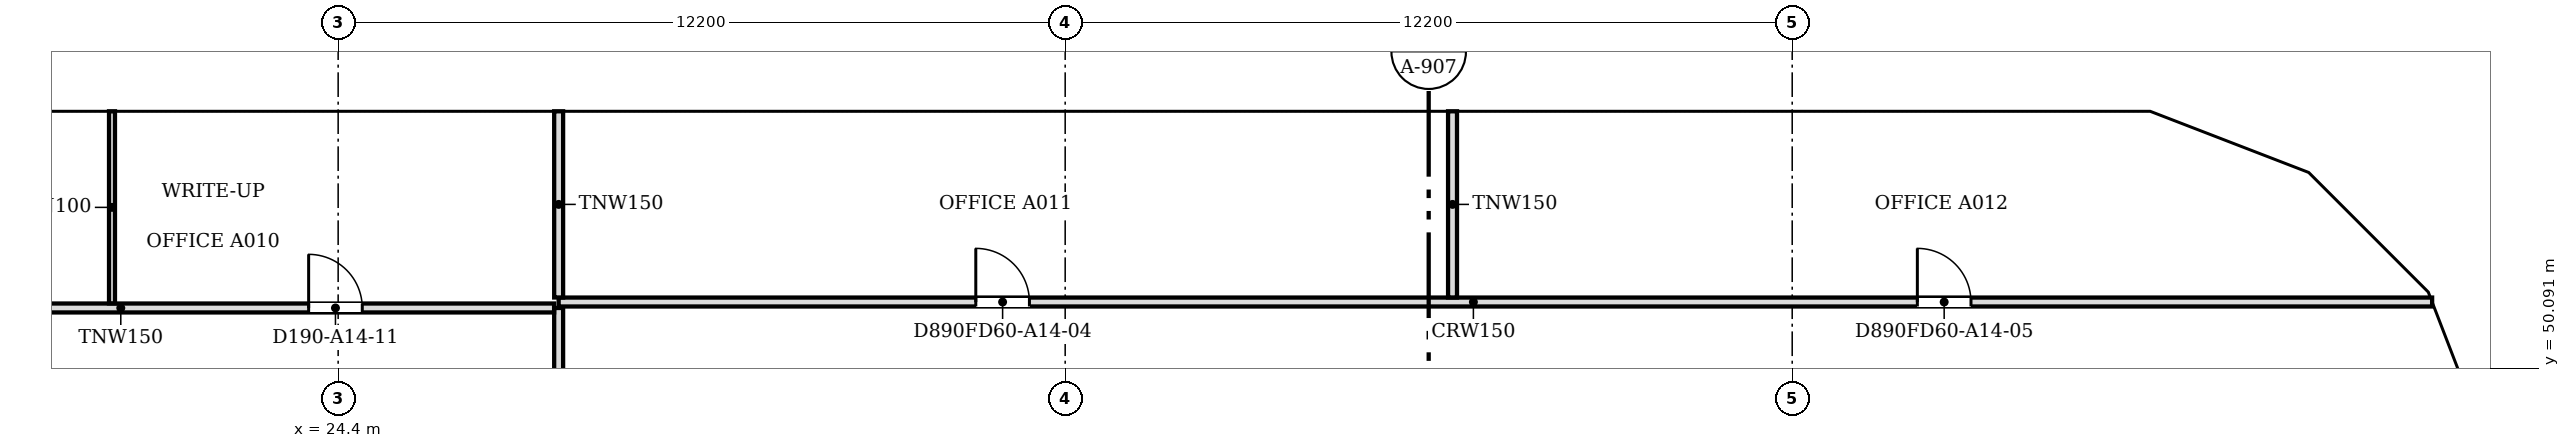
"""IFC4 building model, lengths in metres.
Left out: names, types, materials, properties, quantities, classifications, styles, units other than length and angle.
Written with IfcOpenShell. Run it as: python <this file> out.ifc"""

import sys

from ifc_helpers import new_model, si_unit, direction, frame, frame_2d, origin, place, context, subcontext, project, spatial, polyline, rectangle, outline, extrude, faceted_brep, source, transform, mapped, element, fill, save


model = new_model("IFC4")
c1 = context("Model", 3, precision=1e-05, world=origin(), true_north=direction((0.0, 1.0)))
c2 = subcontext(c1, "Body", "Model", "MODEL_VIEW")
j1 = project(units=[si_unit("LENGTHUNIT", "METRE"), si_unit("PLANEANGLEUNIT", "RADIAN")], contexts=[c1])
p1 = place(None, origin())
s1 = spatial("IfcSite", under=j1, at=p1, CompositionType="ELEMENT")
p2 = place(p1, origin())
s2 = spatial("IfcBuilding", under=s1, at=p2, CompositionType="ELEMENT")
p3 = place(p2, frame((0.0, 0.0, 159.2)))
s3 = spatial("IfcBuildingStorey", under=s2, at=p3, CompositionType="ELEMENT", Elevation=159.2)
m1 = source(origin(), c2, "Body", "Brep", [
    faceted_brep([(0.047, -0.25, 0.0), (2.997, -0.25, 3.8), (0.047, -0.25, 7.6), (0.0, -0.25, 7.541), (0.0, -0.25, 0.059), (0.093, 0.25, 7.54), (2.944, 0.25, 3.868), (2.944, 0.25, 3.732), (0.093, 0.25, 0.06), (2.997, 0.0, 3.8), (0.047, 0.0, 0.0), (0.047, 0.0, 7.6)], [[[0, 1, 2, 3, 4]], [[5, 6, 7, 8]], [[8, 7, 9, 1, 0, 10]], [[6, 5, 11, 2, 1, 9]], [[3, 2, 11]], [[10, 0, 4]], [[8, 10, 4, 3, 11, 5]], [[9, 7, 6]]]),
])
p4 = place(p3, frame((60.767, 48.71, -3.8), z_axis=(0.0, 0.0, 1.0), x_axis=(-0.359901446078, 0.932990326376, 0.0)))
e1 = element("IfcWall", 1, at=p4, inside=s3, PredefinedType="SOLIDWALL", context=c2, shape_type="MappedRepresentation", body=[
    mapped(m1, transform((0.0, 0.0, 0.0), scale=1.0)),
])
m2 = source(origin(), c2, "Body", "SweptSolid", [
    extrude(outline(polyline([(0.247, 0.665), (2.681, 3.8), (0.247, 6.935), (0.247, 0.665)])), frame((0.0, 0.26, 0.0), z_axis=(0.0, -1.0, 0.0), x_axis=(1.0, 0.0, 0.0)), (0.0, 0.0, 1.0), 0.52),
])
p5 = place(p4, origin())
e2 = element("IfcOpeningElement", 2, at=p5, cuts=e1, PredefinedType="OPENING", context=c2, shape_type="MappedRepresentation", body=[
    mapped(m2, transform((0.0, 0.0, 0.0), scale=1.0)),
])
m3 = source(origin(), c2, "Body", "Brep", [
    faceted_brep([(2.944, -0.25, 0.0), (2.997, -0.25, 0.068), (2.997, -0.25, 7.532), (2.944, -0.25, 7.6), (0.0, -0.25, 3.8), (0.053, 0.25, 3.868), (2.891, 0.25, 7.532), (2.891, 0.25, 0.068), (0.053, 0.25, 3.732), (2.944, 0.0, 0.0), (2.944, 0.0, 7.6), (0.0, 0.0, 3.8)], [[[0, 1, 2, 3, 4]], [[5, 6, 7, 8]], [[1, 0, 9]], [[10, 3, 2]], [[6, 5, 11, 4, 3, 10]], [[8, 7, 9, 0, 4, 11]], [[8, 11, 5]], [[1, 9, 7, 6, 10, 2]]]),
])
p6 = place(p3, frame((59.688, 51.506, -3.8), z_axis=(0.0, 0.0, 1.0), x_axis=(-0.707106781187, 0.707106781187, 0.0)))
e3 = element("IfcWall", 3, at=p6, inside=s3, PredefinedType="SOLIDWALL", context=c2, shape_type="MappedRepresentation", body=[
    mapped(m3, transform((0.0, 0.0, 0.0), scale=1.0)),
])
m4 = source(origin(), c2, "Body", "SweptSolid", [
    extrude(outline(polyline([(2.744, 6.934), (0.316, 3.8), (2.744, 0.667), (2.744, 6.934)])), frame((0.0, 0.26, 0.0), z_axis=(0.0, -1.0, 0.0), x_axis=(1.0, 0.0, 0.0)), (0.0, 0.0, 1.0), 0.52),
])
p7 = place(p6, origin())
e4 = element("IfcOpeningElement", 4, at=p7, cuts=e3, PredefinedType="OPENING", context=c2, shape_type="MappedRepresentation", body=[
    mapped(m4, transform((0.0, 0.0, 0.0), scale=1.0)),
])
m5 = source(origin(), c2, "Body", "Brep", [
    faceted_brep([(0.053, -0.25, 0.0), (3.003, -0.25, 3.8), (0.053, -0.25, 7.6), (0.0, -0.25, 7.532), (0.0, -0.25, 0.068), (0.106, 0.25, 7.532), (2.957, 0.25, 3.86), (2.957, 0.25, 3.74), (0.106, 0.25, 0.068), (3.003, 0.0, 3.8), (0.053, 0.0, 0.0), (0.053, 0.0, 7.6)], [[[0, 1, 2, 3, 4]], [[5, 6, 7, 8]], [[8, 7, 9, 1, 0, 10]], [[6, 5, 11, 2, 1, 9]], [[3, 2, 11]], [[10, 0, 4]], [[8, 10, 4, 3, 11, 5]], [[9, 7, 6]]]),
])
p8 = place(p3, frame((57.656, 53.569, -3.8), z_axis=(0.0, 0.0, 1.0), x_axis=(-0.933007896601, 0.359855894603, 0.0)))
e5 = element("IfcWall", 5, at=p8, inside=s3, PredefinedType="SOLIDWALL", context=c2, shape_type="MappedRepresentation", body=[
    mapped(m5, transform((0.0, 0.0, 0.0), scale=1.0)),
])
m6 = source(origin(), c2, "Body", "SweptSolid", [
    extrude(outline(polyline([(0.253, 0.665), (2.687, 3.8), (0.253, 6.935), (0.253, 0.665)])), frame((0.0, 0.26, 0.0), z_axis=(0.0, -1.0, 0.0), x_axis=(1.0, 0.0, 0.0)), (0.0, 0.0, 1.0), 0.52),
])
p9 = place(p8, origin())
e6 = element("IfcOpeningElement", 6, at=p9, cuts=e5, PredefinedType="OPENING", context=c2, shape_type="MappedRepresentation", body=[
    mapped(m6, transform((0.0, 0.0, 0.0), scale=1.0)),
])
m7 = source(origin(), c2, "Body", "Brep", [
    faceted_brep([(3.003, -0.25, 0.0), (6.053, -0.25, 3.8), (3.003, -0.25, 7.6), (0.0, -0.25, 3.8), (0.047, 0.25, 3.859), (3.003, 0.25, 7.6), (6.053, 0.25, 3.8), (3.003, 0.25, 0.0), (0.047, 0.25, 3.741), (0.0, 0.0, 3.8)], [[[0, 1, 2, 3]], [[4, 5, 6, 7, 8]], [[7, 6, 1, 0]], [[6, 5, 2, 1]], [[5, 4, 9, 3, 2]], [[8, 7, 0, 3, 9]], [[8, 9, 4]]]),
])
p10 = place(p3, frame((54.854, 54.65, -3.8), z_axis=(0.0, 0.0, 1.0), x_axis=(-1.0, 0.0, 0.0)))
e7 = element("IfcWall", 7, at=p10, inside=s3, PredefinedType="SOLIDWALL", context=c2, shape_type="MappedRepresentation", body=[
    mapped(m7, transform((0.0, 0.0, 0.0), scale=1.0)),
])
m8 = source(origin(), c2, "Body", "SweptSolid", [
    extrude(outline(polyline([(3.005, 0.401), (5.733, 3.8), (3.005, 7.199), (0.319, 3.8), (3.005, 0.401)])), frame((0.0, 0.26, 0.0), z_axis=(0.0, -1.0, 0.0), x_axis=(1.0, 0.0, 0.0)), (0.0, 0.0, 1.0), 0.52),
])
p11 = place(p10, origin())
e8 = element("IfcOpeningElement", 8, at=p11, cuts=e7, PredefinedType="OPENING", context=c2, shape_type="MappedRepresentation", body=[
    mapped(m8, transform((0.0, 0.0, 0.0), scale=1.0)),
])
m9 = source(origin(), c2, "Body", "SweptSolid", [
    extrude(outline(polyline([(3.05, 0.0), (6.1, 3.8), (3.05, 7.6), (0.0, 3.8), (3.05, 0.0)])), frame((0.0, 0.25, 0.0), z_axis=(0.0, -1.0, 0.0), x_axis=(1.0, 0.0, 0.0)), (0.0, 0.0, 1.0), 0.5),
])
p12 = place(p3, frame((48.8, 54.65, -3.8), z_axis=(0.0, 0.0, 1.0), x_axis=(-1.0, 0.0, 0.0)))
e9 = element("IfcWall", 9, at=p12, inside=s3, PredefinedType="SOLIDWALL", context=c2, shape_type="MappedRepresentation", body=[
    mapped(m9, transform((0.0, 0.0, 0.0), scale=1.0)),
])
m10 = source(origin(), c2, "Body", "SweptSolid", [
    extrude(outline(polyline([(3.05, 0.399), (5.78, 3.8), (3.05, 7.201), (0.321, 3.8), (3.05, 0.399)])), frame((0.0, 0.26, 0.0), z_axis=(0.0, -1.0, 0.0), x_axis=(1.0, 0.0, 0.0)), (0.0, 0.0, 1.0), 0.52),
])
p13 = place(p12, origin())
e10 = element("IfcOpeningElement", 10, at=p13, cuts=e9, PredefinedType="OPENING", context=c2, shape_type="MappedRepresentation", body=[
    mapped(m10, transform((0.0, 0.0, 0.0), scale=1.0)),
])
m11 = source(origin(), c2, "Body", "Brep", [
    faceted_brep([(3.05, -0.25, 0.0), (6.1, -0.25, 3.8), (6.1, -0.25, 3.8), (3.05, -0.25, 7.6), (0.0, -0.25, 3.8), (0.0, 0.25, 3.8), (3.05, 0.25, 7.6), (6.1, 0.25, 3.8), (6.1, 0.25, 3.8), (3.05, 0.25, 0.0)], [[[0, 1, 2, 3, 4]], [[5, 6, 7, 8, 9]], [[9, 8, 1, 0]], [[7, 6, 3, 2]], [[6, 5, 4, 3]], [[5, 9, 0, 4]], [[1, 8, 7, 2]]]),
])
p14 = place(p3, frame((42.7, 54.65, -3.8), z_axis=(0.0, 0.0, 1.0), x_axis=(-1.0, 0.0, 0.0)))
e11 = element("IfcWall", 11, at=p14, inside=s3, PredefinedType="SOLIDWALL", context=c2, shape_type="MappedRepresentation", body=[
    mapped(m11, transform((0.0, 0.0, 0.0), scale=1.0)),
])
p15 = place(p14, origin())
e12 = element("IfcOpeningElement", 12, at=p15, cuts=e11, PredefinedType="OPENING", context=c2, shape_type="MappedRepresentation", body=[
    mapped(m10, transform((0.0, 0.0, 0.0), scale=1.0)),
])
p16 = place(p3, frame((36.6, 54.65, -3.8), z_axis=(0.0, 0.0, 1.0), x_axis=(-1.0, 0.0, 0.0)))
e13 = element("IfcWall", 13, at=p16, inside=s3, PredefinedType="SOLIDWALL", context=c2, shape_type="MappedRepresentation", body=[
    mapped(m9, transform((0.0, 0.0, 0.0), scale=1.0)),
])
p17 = place(p16, origin())
e14 = element("IfcOpeningElement", 14, at=p17, cuts=e13, PredefinedType="OPENING", context=c2, shape_type="MappedRepresentation", body=[
    mapped(m10, transform((0.0, 0.0, 0.0), scale=1.0)),
])
p18 = place(p3, frame((30.5, 54.65, -3.8), z_axis=(0.0, 0.0, 1.0), x_axis=(-1.0, 0.0, 0.0)))
e15 = element("IfcWall", 15, at=p18, inside=s3, PredefinedType="SOLIDWALL", context=c2, shape_type="MappedRepresentation", body=[
    mapped(m9, transform((0.0, 0.0, 0.0), scale=1.0)),
])
p19 = place(p18, origin())
e16 = element("IfcOpeningElement", 16, at=p19, cuts=e15, PredefinedType="OPENING", context=c2, shape_type="MappedRepresentation", body=[
    mapped(m10, transform((0.0, 0.0, 0.0), scale=1.0)),
])
p20 = place(p3, frame((24.4, 54.65, -3.8), z_axis=(0.0, 0.0, 1.0), x_axis=(-1.0, 0.0, 0.0)))
e17 = element("IfcWall", 17, at=p20, inside=s3, PredefinedType="SOLIDWALL", context=c2, shape_type="MappedRepresentation", body=[
    mapped(m11, transform((0.0, 0.0, 0.0), scale=1.0)),
])
p21 = place(p20, origin())
e18 = element("IfcOpeningElement", 18, at=p21, cuts=e17, PredefinedType="OPENING", context=c2, shape_type="MappedRepresentation", body=[
    mapped(m10, transform((0.0, 0.0, 0.0), scale=1.0)),
])
p22 = place(p2, frame((0.0, 0.0, 163.0)))
s4 = spatial("IfcBuildingStorey", under=s2, at=p22, CompositionType="ELEMENT", Elevation=163.0)
m12 = source(origin(), c2, "Body", "Brep", [
    faceted_brep([(2.95, -0.25, 0.0), (3.003, -0.25, 0.068), (3.003, -0.25, 7.532), (2.95, -0.25, 7.6), (0.0, -0.25, 3.8), (0.047, 0.25, 3.86), (2.898, 0.25, 7.532), (2.898, 0.25, 0.068), (0.047, 0.25, 3.74), (2.95, 0.0, 0.0), (2.95, 0.0, 7.6), (0.0, 0.0, 3.8)], [[[0, 1, 2, 3, 4]], [[5, 6, 7, 8]], [[1, 0, 9]], [[10, 3, 2]], [[6, 5, 11, 4, 3, 10]], [[8, 7, 9, 0, 4, 11]], [[8, 11, 5]], [[1, 9, 7, 6, 10, 2]]]),
])
p23 = place(p22, frame((60.75, 48.753, -3.8), z_axis=(0.0, 0.0, 1.0), x_axis=(-0.35992665181, 0.932980602862, 0.0)))
e19 = element("IfcWall", 19, at=p23, inside=s4, PredefinedType="SOLIDWALL", context=c2, shape_type="MappedRepresentation", body=[
    mapped(m12, transform((0.0, 0.0, 0.0), scale=1.0)),
])
m13 = source(origin(), c2, "Body", "SweptSolid", [
    extrude(outline(polyline([(2.75, 6.935), (0.316, 3.8), (2.75, 0.665), (2.75, 6.935)])), frame((0.0, 0.26, 0.0), z_axis=(0.0, -1.0, 0.0), x_axis=(1.0, 0.0, 0.0)), (0.0, 0.0, 1.0), 0.52),
])
p24 = place(p23, origin())
e20 = element("IfcOpeningElement", 20, at=p24, cuts=e19, PredefinedType="OPENING", context=c2, shape_type="MappedRepresentation", body=[
    mapped(m13, transform((0.0, 0.0, 0.0), scale=1.0)),
])
m14 = source(origin(), c2, "Body", "Brep", [
    faceted_brep([(0.053, -0.25, 0.0), (2.997, -0.25, 3.8), (0.053, -0.25, 7.6), (0.0, -0.25, 7.532), (0.0, -0.25, 0.068), (0.106, 0.25, 7.532), (2.944, 0.25, 3.868), (2.944, 0.25, 3.732), (0.106, 0.25, 0.068), (2.997, 0.0, 3.8), (0.053, 0.0, 0.0), (0.053, 0.0, 7.6)], [[[0, 1, 2, 3, 4]], [[5, 6, 7, 8]], [[8, 7, 9, 1, 0, 10]], [[6, 5, 11, 2, 1, 9]], [[3, 2, 11]], [[10, 0, 4]], [[8, 10, 4, 3, 11, 5]], [[9, 7, 6]]]),
])
p25 = place(p22, frame((59.726, 51.469, -3.8), z_axis=(0.0, 0.0, 1.0), x_axis=(-0.707106781187, 0.707106781187, 0.0)))
e21 = element("IfcWall", 21, at=p25, inside=s4, PredefinedType="SOLIDWALL", context=c2, shape_type="MappedRepresentation", body=[
    mapped(m14, transform((0.0, 0.0, 0.0), scale=1.0)),
])
m15 = source(origin(), c2, "Body", "SweptSolid", [
    extrude(outline(polyline([(0.253, 0.666), (2.681, 3.8), (0.253, 6.934), (0.253, 0.666)])), frame((0.0, 0.26, 0.0), z_axis=(0.0, -1.0, 0.0), x_axis=(1.0, 0.0, 0.0)), (0.0, 0.0, 1.0), 0.52),
])
p26 = place(p25, origin())
e22 = element("IfcOpeningElement", 22, at=p26, cuts=e21, PredefinedType="OPENING", context=c2, shape_type="MappedRepresentation", body=[
    mapped(m15, transform((0.0, 0.0, 0.0), scale=1.0)),
])
m16 = source(origin(), c2, "Body", "Brep", [
    faceted_brep([(2.95, -0.25, 0.0), (2.997, -0.25, 0.059), (2.997, -0.25, 7.541), (2.95, -0.25, 7.6), (0.0, -0.25, 3.8), (0.053, 0.25, 3.868), (2.904, 0.25, 7.54), (2.904, 0.25, 0.06), (0.053, 0.25, 3.732), (2.95, 0.0, 0.0), (2.95, 0.0, 7.6), (0.0, 0.0, 3.8)], [[[0, 1, 2, 3, 4]], [[5, 6, 7, 8]], [[1, 0, 9]], [[10, 3, 2]], [[6, 5, 11, 4, 3, 10]], [[8, 7, 9, 0, 4, 11]], [[8, 11, 5]], [[1, 9, 7, 6, 10, 2]]]),
])
p27 = place(p22, frame((57.606, 53.588, -3.8), z_axis=(0.0, 0.0, 1.0), x_axis=(-0.932990326376, 0.359901446078, 0.0)))
e23 = element("IfcWall", 23, at=p27, inside=s4, PredefinedType="SOLIDWALL", context=c2, shape_type="MappedRepresentation", body=[
    mapped(m16, transform((0.0, 0.0, 0.0), scale=1.0)),
])
p28 = place(p27, origin())
e24 = element("IfcOpeningElement", 24, at=p28, cuts=e23, PredefinedType="OPENING", context=c2, shape_type="MappedRepresentation", body=[
    mapped(m13, transform((0.0, 0.0, 0.0), scale=1.0)),
])
m17 = source(origin(), c2, "Body", "Brep", [
    faceted_brep([(0.047, -0.25, 0.0), (3.05, -0.25, 3.8), (0.047, -0.25, 7.6), (0.0, -0.25, 7.54), (0.0, -0.25, 0.06), (0.093, 0.25, 7.541), (3.05, 0.25, 3.8), (0.093, 0.25, 0.059), (0.047, 0.0, 0.0), (0.047, 0.0, 7.6)], [[[0, 1, 2, 3, 4]], [[5, 6, 7]], [[7, 6, 1, 0, 8]], [[6, 5, 9, 2, 1]], [[3, 2, 9]], [[8, 0, 4]], [[7, 8, 4, 3, 9, 5]]]),
])
p29 = place(p22, frame((54.9, 54.65, -3.8), z_axis=(0.0, 0.0, 1.0), x_axis=(-1.0, 0.0, 0.0)))
e25 = element("IfcWall", 25, at=p29, inside=s4, PredefinedType="SOLIDWALL", context=c2, shape_type="MappedRepresentation", body=[
    mapped(m17, transform((0.0, 0.0, 0.0), scale=1.0)),
])
m18 = source(origin(), c2, "Body", "SweptSolid", [
    extrude(outline(polyline([(0.247, 0.656), (2.731, 3.8), (0.247, 6.944), (0.247, 0.656)])), frame((0.0, 0.26, 0.0), z_axis=(0.0, -1.0, 0.0), x_axis=(1.0, 0.0, 0.0)), (0.0, 0.0, 1.0), 0.52),
])
p30 = place(p29, origin())
e26 = element("IfcOpeningElement", 26, at=p30, cuts=e25, PredefinedType="OPENING", context=c2, shape_type="MappedRepresentation", body=[
    mapped(m18, transform((0.0, 0.0, 0.0), scale=1.0)),
])
p31 = place(p22, frame((51.85, 54.65, -3.8), z_axis=(0.0, 0.0, 1.0), x_axis=(-1.0, 0.0, 0.0)))
e27 = element("IfcWall", 27, at=p31, inside=s4, PredefinedType="SOLIDWALL", context=c2, shape_type="MappedRepresentation", body=[
    mapped(m9, transform((0.0, 0.0, 0.0), scale=1.0)),
])
p32 = place(p31, origin())
e28 = element("IfcOpeningElement", 28, at=p32, cuts=e27, PredefinedType="OPENING", context=c2, shape_type="MappedRepresentation", body=[
    mapped(m10, transform((0.0, 0.0, 0.0), scale=1.0)),
])
p33 = place(p22, frame((45.75, 54.65, -3.8), z_axis=(0.0, 0.0, 1.0), x_axis=(-1.0, 0.0, 0.0)))
e29 = element("IfcWall", 29, at=p33, inside=s4, PredefinedType="SOLIDWALL", context=c2, shape_type="MappedRepresentation", body=[
    mapped(m9, transform((0.0, 0.0, 0.0), scale=1.0)),
])
p34 = place(p33, origin())
e30 = element("IfcOpeningElement", 30, at=p34, cuts=e29, PredefinedType="OPENING", context=c2, shape_type="MappedRepresentation", body=[
    mapped(m10, transform((0.0, 0.0, 0.0), scale=1.0)),
])
p35 = place(p22, frame((39.65, 54.65, -3.8), z_axis=(0.0, 0.0, 1.0), x_axis=(-1.0, 0.0, 0.0)))
e31 = element("IfcWall", 31, at=p35, inside=s4, PredefinedType="SOLIDWALL", context=c2, shape_type="MappedRepresentation", body=[
    mapped(m11, transform((0.0, 0.0, 0.0), scale=1.0)),
])
p36 = place(p35, origin())
e32 = element("IfcOpeningElement", 32, at=p36, cuts=e31, PredefinedType="OPENING", context=c2, shape_type="MappedRepresentation", body=[
    mapped(m10, transform((0.0, 0.0, 0.0), scale=1.0)),
])
p37 = place(p22, frame((33.55, 54.65, -3.8), z_axis=(0.0, 0.0, 1.0), x_axis=(-1.0, 0.0, 0.0)))
e33 = element("IfcWall", 33, at=p37, inside=s4, PredefinedType="SOLIDWALL", context=c2, shape_type="MappedRepresentation", body=[
    mapped(m9, transform((0.0, 0.0, 0.0), scale=1.0)),
])
p38 = place(p37, origin())
e34 = element("IfcOpeningElement", 34, at=p38, cuts=e33, PredefinedType="OPENING", context=c2, shape_type="MappedRepresentation", body=[
    mapped(m10, transform((0.0, 0.0, 0.0), scale=1.0)),
])
p39 = place(p22, frame((27.45, 54.65, -3.8), z_axis=(0.0, 0.0, 1.0), x_axis=(-1.0, 0.0, 0.0)))
e35 = element("IfcWall", 35, at=p39, inside=s4, PredefinedType="SOLIDWALL", context=c2, shape_type="MappedRepresentation", body=[
    mapped(m11, transform((0.0, 0.0, 0.0), scale=1.0)),
])
p40 = place(p39, origin())
e36 = element("IfcOpeningElement", 36, at=p40, cuts=e35, PredefinedType="OPENING", context=c2, shape_type="MappedRepresentation", body=[
    mapped(m10, transform((0.0, 0.0, 0.0), scale=1.0)),
])
p41 = place(p22, frame((21.35, 54.65, -3.8), z_axis=(0.0, 0.0, 1.0), x_axis=(-1.0, 0.0, 0.0)))
e37 = element("IfcWall", 37, at=p41, inside=s4, PredefinedType="SOLIDWALL", context=c2, shape_type="MappedRepresentation", body=[
    mapped(m9, transform((0.0, 0.0, 0.0), scale=1.0)),
])
p42 = place(p41, origin())
e38 = element("IfcOpeningElement", 38, at=p42, cuts=e37, PredefinedType="OPENING", context=c2, shape_type="MappedRepresentation", body=[
    mapped(m10, transform((0.0, 0.0, 0.0), scale=1.0)),
])
p43 = place(p3, frame((28.1, 47.776, 0.0), z_axis=(0.0, 0.0, 1.0), x_axis=(0.0, 1.0, 0.0)))
e39 = element("IfcWall", 39, at=p43, inside=s3, PredefinedType="PARTITIONING", context=c2, shape_type="SweptSolid", body=[
    extrude(rectangle(XDim=3.324, YDim=0.15, at=frame_2d((1.662, 0.0))), origin(), (0.0, 0.0, 1.0), 3.067),
])
p44 = place(p3, frame((13.6, 51.1, 0.0), z_axis=(0.0, 0.0, 1.0), x_axis=(1.0, 0.0, 0.0)))
e40 = element("IfcWall", 40, at=p44, inside=s3, PredefinedType="PARTITIONING", context=c2, shape_type="SweptSolid", body=[
    extrude(rectangle(XDim=14.424, YDim=0.15, at=frame_2d((7.212, 0.0))), origin(), (0.0, 0.0, 1.0), 3.067),
])
m19 = source(origin(), c2, "Body", "SweptSolid", [
    extrude(rectangle(XDim=0.9, YDim=2.1, at=frame_2d((0.45, 1.05))), frame((0.0, 0.085, 0.0), z_axis=(0.0, -1.0, 0.0), x_axis=(1.0, 0.0, 0.0)), (0.0, 0.0, 1.0), 0.17),
])
p45 = place(p44, frame((3.1, 0.0, 0.0)))
e41 = element("IfcOpeningElement", 41, at=p45, cuts=e40, PredefinedType="OPENING", context=c2, shape_type="MappedRepresentation", body=[
    mapped(m19, transform((0.0, 0.0, 0.0), scale=1.0)),
])
p46 = place(p44, frame((10.305, 0.0, 0.0)))
e42 = element("IfcOpeningElement", 42, at=p46, cuts=e40, PredefinedType="OPENING", context=c2, shape_type="MappedRepresentation", body=[
    mapped(m19, transform((0.0, 0.0, 0.0), scale=1.0)),
])
p47 = place(p3, frame((20.605, 51.176, 0.0), z_axis=(0.0, 0.0, 1.0), x_axis=(0.0, 1.0, 0.0)))
e43 = element("IfcWall", 43, at=p47, inside=s3, PredefinedType="PARTITIONING", context=c2, shape_type="SweptSolid", body=[
    extrude(rectangle(XDim=3.224, YDim=0.1, at=frame_2d((1.612, 0.0))), origin(), (0.0, 0.0, 1.0), 3.067),
])
p48 = place(p3, frame((28.1, 51.2, 0.0), z_axis=(0.0, 0.0, 1.0), x_axis=(1.0, 0.0, 0.0)))
e44 = element("IfcWall", 44, at=p48, inside=s3, PredefinedType="PARTITIONING", context=c2, shape_type="SweptSolid", body=[
    extrude(rectangle(XDim=31.438, YDim=0.15, at=frame_2d((15.719, 0.0))), origin(), (0.0, 0.0, 1.0), 3.067),
])
p49 = place(p48, frame((7.0, 0.0, 0.0)))
e45 = element("IfcOpeningElement", 45, at=p49, cuts=e44, PredefinedType="OPENING", context=c2, shape_type="MappedRepresentation", body=[
    mapped(m19, transform((0.0, 0.0, 0.0), scale=1.0)),
])
p50 = place(p48, frame((22.8, 0.0, 0.0)))
e46 = element("IfcOpeningElement", 46, at=p50, cuts=e44, PredefinedType="OPENING", context=c2, shape_type="MappedRepresentation", body=[
    mapped(m19, transform((0.0, 0.0, 0.0), scale=1.0)),
])
for number, where, z_axis, x_axis in (
    (47, (28.1, 51.276, 0.0), (0.0, 0.0, 1.0), (0.0, 1.0, 0.0)),
    (48, (43.1, 51.276, 0.0), (0.0, 0.0, 1.0), (0.0, 1.0, 0.0)),
):
    element("IfcWall", number, at=place(p3, frame(where, z_axis=z_axis, x_axis=x_axis)), inside=s3, PredefinedType="PARTITIONING", context=c2, shape_type="SweptSolid", body=[
        extrude(rectangle(XDim=3.124, YDim=0.15, at=frame_2d((1.562, 0.0))), origin(), (0.0, 0.0, 1.0), 3.067),
    ])
m20 = source(origin(), c2, "Body", "SweptSolid", [
    extrude(rectangle(XDim=0.9, YDim=2.1, at=frame_2d((0.45, 1.05))), frame((0.0, 0.025, 0.0), z_axis=(0.0, -1.0, 0.0), x_axis=(1.0, 0.0, 0.0)), (0.0, 0.0, 1.0), 0.05),
])
p51 = place(p46, origin())
e49 = element("IfcDoor", 49, at=p51, inside=s3, OperationType="SINGLE_SWING_LEFT", PredefinedType="DOOR", context=c2, shape_type="MappedRepresentation", body=[
    mapped(m20, transform((0.0, 0.0, 0.0), scale=1.0)),
])
fill(e42, e49)
p52 = place(p49, origin())
e50 = element("IfcDoor", 50, at=p52, inside=s3, OperationType="SINGLE_SWING_LEFT", PredefinedType="DOOR", context=c2, shape_type="MappedRepresentation", body=[
    mapped(m20, transform((0.0, 0.0, 0.0), scale=1.0)),
])
fill(e45, e50)
p53 = place(p50, origin())
e51 = element("IfcDoor", 51, at=p53, inside=s3, OperationType="SINGLE_SWING_LEFT", PredefinedType="DOOR", context=c2, shape_type="MappedRepresentation", body=[
    mapped(m20, transform((0.0, 0.0, 0.0), scale=1.0)),
])
fill(e46, e51)
save(model, sys.argv[1])
